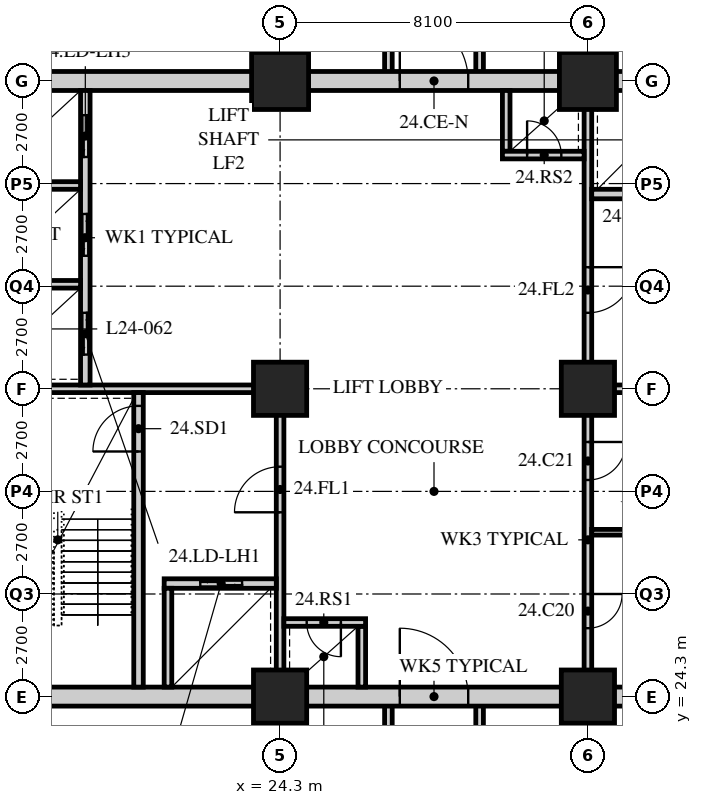
"""IFC4 building model, lengths in metres.
Left out: names, types, materials, properties, quantities, classifications, styles, units other than length and angle.
Written with IfcOpenShell. Run it as: python <this file> out.ifc"""

import sys

from ifc_helpers import new_model, si_unit, direction, frame, frame_2d, origin, origin_2d, place, context, subcontext, project, spatial, rectangle, hollow_rectangle, extrude, element, fill, save


model = new_model("IFC4")
c1 = context("Model", 3, precision=1e-05, world=origin(), true_north=direction((0.0, 1.0)))
c2 = subcontext(c1, "Body", "Model", "MODEL_VIEW")
j1 = project(units=[si_unit("LENGTHUNIT", "METRE"), si_unit("PLANEANGLEUNIT", "RADIAN")], contexts=[c1])
p1 = place(None, origin())
s1 = spatial("IfcSite", under=j1, at=p1, CompositionType="ELEMENT")
p2 = place(p1, origin())
s2 = spatial("IfcBuilding", under=s1, at=p2, CompositionType="ELEMENT")
p3 = place(p2, frame((0.0, 0.0, 98.0)))
s3 = spatial("IfcBuildingStorey", under=s2, at=p3, CompositionType="ELEMENT", Elevation=98.0)
for number, where, z_axis, x_axis in (
    (1, (24.3, 24.3, 0.0), (0.0, 0.0, 1.0), (1.0, 0.0, 0.0)),
    (2, (24.3, 32.4, 0.0), (0.0, 0.0, 1.0), (1.0, 0.0, 0.0)),
):
    element("IfcColumn", number, at=place(p3, frame(where, z_axis=z_axis, x_axis=x_axis)), inside=s3, PredefinedType="COLUMN", context=c2, shape_type="SweptSolid", body=[
        extrude(hollow_rectangle(XDim=1.4, YDim=1.4, WallThickness=0.12, at=origin_2d()), origin(), (0.0, 0.0, 1.0), 5.4),
    ])
p4 = place(p3, frame((24.3, 40.5, 0.0), z_axis=(0.0, 0.0, 1.0), x_axis=(1.0, 0.0, 0.0)))
e3 = element("IfcColumn", 3, at=p4, inside=s3, PredefinedType="COLUMN", context=c2, shape_type="SweptSolid", body=[
    extrude(hollow_rectangle(XDim=1.5, YDim=1.5, WallThickness=0.13, at=origin_2d()), origin(), (0.0, 0.0, 1.0), 5.4),
])
for number, where, z_axis, x_axis in (
    (4, (32.4, 24.3, 0.0), (0.0, 0.0, 1.0), (1.0, 0.0, 0.0)),
    (5, (32.4, 32.4, 0.0), (0.0, 0.0, 1.0), (1.0, 0.0, 0.0)),
):
    element("IfcColumn", number, at=place(p3, frame(where, z_axis=z_axis, x_axis=x_axis)), inside=s3, PredefinedType="COLUMN", context=c2, shape_type="SweptSolid", body=[
        extrude(hollow_rectangle(XDim=1.4, YDim=1.4, WallThickness=0.12, at=origin_2d()), origin(), (0.0, 0.0, 1.0), 5.4),
    ])
p5 = place(p3, frame((32.4, 40.5, 0.0), z_axis=(0.0, 0.0, 1.0), x_axis=(1.0, 0.0, 0.0)))
e6 = element("IfcColumn", 6, at=p5, inside=s3, PredefinedType="COLUMN", context=c2, shape_type="SweptSolid", body=[
    extrude(hollow_rectangle(XDim=1.5, YDim=1.5, WallThickness=0.13, at=origin_2d()), origin(), (0.0, 0.0, 1.0), 5.4),
])
for number, where, z_axis, x_axis in (
    (7, (27.15, 15.3, 0.0), (0.0, 0.0, 1.0), (0.0, 1.0, 0.0)),
    (8, (29.55, 15.3, 0.0), (0.0, 0.0, 1.0), (0.0, 1.0, 0.0)),
):
    element("IfcWall", number, at=place(p3, frame(where, z_axis=z_axis, x_axis=x_axis)), inside=s3, PredefinedType="SOLIDWALL", context=c2, shape_type="SweptSolid", body=[
        extrude(rectangle(XDim=9.0, YDim=0.2, at=frame_2d((4.5, 0.0))), origin(), (0.0, 0.0, 1.0), 5.19),
    ])
for number, where, z_axis, x_axis in (
    (9, (27.15, 40.5, 0.0), (0.0, 0.0, 1.0), (0.0, 1.0, 0.0)),
    (10, (29.55, 40.5, 0.0), (0.0, 0.0, 1.0), (0.0, 1.0, 0.0)),
):
    element("IfcWall", number, at=place(p3, frame(where, z_axis=z_axis, x_axis=x_axis)), inside=s3, PredefinedType="SOLIDWALL", context=c2, shape_type="SweptSolid", body=[
        extrude(rectangle(XDim=3.6, YDim=0.2, at=frame_2d((1.8, 0.0))), origin(), (0.0, 0.0, 1.0), 5.19),
    ])
p6 = place(p3, frame((15.95, 24.3, 0.0), z_axis=(0.0, 0.0, 1.0), x_axis=(1.0, 0.0, 0.0)))
e11 = element("IfcWall", 11, at=p6, inside=s3, PredefinedType="SOLIDWALL", context=c2, shape_type="SweptSolid", body=[
    extrude(rectangle(XDim=24.8, YDim=0.5, at=frame_2d((12.4, 0.0))), origin(), (0.0, 0.0, 1.0), 4.49),
])
p7 = place(p6, frame((11.5, 0.0, 0.0)))
e12 = element("IfcOpeningElement", 12, at=p7, cuts=e11, PredefinedType="OPENING", context=c2, shape_type="SweptSolid", body=[
    extrude(rectangle(XDim=1.8, YDim=2.4, at=frame_2d((0.9, 1.2))), frame((0.0, 0.26, 0.0), z_axis=(0.0, -1.0, 0.0), x_axis=(1.0, 0.0, 0.0)), (0.0, 0.0, 1.0), 0.52),
])
p8 = place(p3, frame((15.95, 40.5, 0.0), z_axis=(0.0, 0.0, 1.0), x_axis=(1.0, 0.0, 0.0)))
e13 = element("IfcWall", 13, at=p8, inside=s3, PredefinedType="SOLIDWALL", context=c2, shape_type="SweptSolid", body=[
    extrude(rectangle(XDim=24.8, YDim=0.5, at=frame_2d((12.4, 0.0))), origin(), (0.0, 0.0, 1.0), 4.49),
])
p9 = place(p8, frame((11.5, 0.0, 0.0)))
e14 = element("IfcOpeningElement", 14, at=p9, cuts=e13, PredefinedType="OPENING", context=c2, shape_type="SweptSolid", body=[
    extrude(rectangle(XDim=1.8, YDim=2.4, at=frame_2d((0.9, 1.2))), frame((0.0, 0.26, 0.0), z_axis=(0.0, -1.0, 0.0), x_axis=(1.0, 0.0, 0.0)), (0.0, 0.0, 1.0), 0.52),
])
p10 = place(p3, frame((16.45, 32.4, 0.0), z_axis=(0.0, 0.0, 1.0), x_axis=(1.0, 0.0, 0.0)))
e15 = element("IfcWall", 15, at=p10, inside=s3, PredefinedType="SOLIDWALL", context=c2, shape_type="SweptSolid", body=[
    extrude(rectangle(XDim=7.95, YDim=0.2, at=frame_2d((3.975, 0.0))), origin(), (0.0, 0.0, 1.0), 4.578),
])
p11 = place(p3, frame((24.3, 24.55, 0.0), z_axis=(0.0, 0.0, 1.0), x_axis=(0.0, 1.0, 0.0)))
e16 = element("IfcWall", 16, at=p11, inside=s3, PredefinedType="SOLIDWALL", context=c2, shape_type="SweptSolid", body=[
    extrude(rectangle(XDim=7.75, YDim=0.2, at=frame_2d((3.875, 0.0))), origin(), (0.0, 0.0, 1.0), 4.578),
])
p12 = place(p11, frame((4.6, 0.0, 0.0)))
e17 = element("IfcOpeningElement", 17, at=p12, cuts=e16, PredefinedType="OPENING", context=c2, shape_type="SweptSolid", body=[
    extrude(rectangle(XDim=1.2, YDim=2.1, at=frame_2d((0.6, 1.05))), frame((0.0, 0.11, 0.0), z_axis=(0.0, -1.0, 0.0), x_axis=(1.0, 0.0, 0.0)), (0.0, 0.0, 1.0), 0.22),
])
p13 = place(p3, frame((20.575, 24.55, 0.0), z_axis=(0.0, 0.0, 1.0), x_axis=(0.0, 1.0, 0.0)))
e18 = element("IfcWall", 18, at=p13, inside=s3, PredefinedType="SOLIDWALL", context=c2, shape_type="SweptSolid", body=[
    extrude(rectangle(XDim=7.75, YDim=0.25, at=frame_2d((3.875, 0.0))), origin(), (0.0, 0.0, 1.0), 5.19),
])
p14 = place(p13, frame((6.2, 0.0, 0.0)))
e19 = element("IfcOpeningElement", 19, at=p14, cuts=e18, PredefinedType="OPENING", context=c2, shape_type="SweptSolid", body=[
    extrude(rectangle(XDim=1.2, YDim=2.1, at=frame_2d((0.6, 1.05))), frame((0.0, 0.135, 0.0), z_axis=(0.0, -1.0, 0.0), x_axis=(1.0, 0.0, 0.0)), (0.0, 0.0, 1.0), 0.27),
])
p15 = place(p3, frame((21.25, 27.275, 0.0), z_axis=(0.0, 0.0, 1.0), x_axis=(1.0, 0.0, 0.0)))
e20 = element("IfcWall", 20, at=p15, inside=s3, PredefinedType="SOLIDWALL", context=c2, shape_type="SweptSolid", body=[
    extrude(rectangle(XDim=2.95, YDim=0.25, at=frame_2d((1.475, 0.0))), origin(), (0.0, 0.0, 1.0), 5.19),
])
p16 = place(p15, frame((0.95, 0.0, 0.0)))
e21 = element("IfcOpeningElement", 21, at=p16, cuts=e20, PredefinedType="OPENING", context=c2, shape_type="SweptSolid", body=[
    extrude(rectangle(XDim=1.1, YDim=2.4, at=frame_2d((0.55, 1.2))), frame((0.0, 0.135, 0.0), z_axis=(0.0, -1.0, 0.0), x_axis=(1.0, 0.0, 0.0)), (0.0, 0.0, 1.0), 0.27),
])
p17 = place(p3, frame((21.35, 24.55, 0.0), z_axis=(0.0, 0.0, 1.0), x_axis=(0.0, 1.0, 0.0)))
e22 = element("IfcWall", 22, at=p17, inside=s3, PredefinedType="SOLIDWALL", context=c2, shape_type="SweptSolid", body=[
    extrude(rectangle(XDim=2.6, YDim=0.2, at=frame_2d((1.3, 0.0))), origin(), (0.0, 0.0, 1.0), 5.19),
])
p18 = place(p3, frame((19.175, 32.5, 0.0), z_axis=(0.0, 0.0, 1.0), x_axis=(0.0, 1.0, 0.0)))
e23 = element("IfcWall", 23, at=p18, inside=s3, PredefinedType="SOLIDWALL", context=c2, shape_type="SweptSolid", body=[
    extrude(rectangle(XDim=7.75, YDim=0.25, at=frame_2d((3.875, 0.0))), origin(), (0.0, 0.0, 1.0), 5.19),
])
p19 = place(p18, frame((0.8, 0.0, 0.0)))
e24 = element("IfcOpeningElement", 24, at=p19, cuts=e23, PredefinedType="OPENING", context=c2, shape_type="SweptSolid", body=[
    extrude(rectangle(XDim=1.1, YDim=2.4, at=frame_2d((0.55, 1.2))), frame((0.0, 0.135, 0.0), z_axis=(0.0, -1.0, 0.0), x_axis=(1.0, 0.0, 0.0)), (0.0, 0.0, 1.0), 0.27),
])
p20 = place(p18, frame((3.4, 0.0, 0.0)))
e25 = element("IfcOpeningElement", 25, at=p20, cuts=e23, PredefinedType="OPENING", context=c2, shape_type="SweptSolid", body=[
    extrude(rectangle(XDim=1.1, YDim=2.4, at=frame_2d((0.55, 1.2))), frame((0.0, 0.135, 0.0), z_axis=(0.0, -1.0, 0.0), x_axis=(1.0, 0.0, 0.0)), (0.0, 0.0, 1.0), 0.27),
])
p21 = place(p18, frame((6.0, 0.0, 0.0)))
e26 = element("IfcOpeningElement", 26, at=p21, cuts=e23, PredefinedType="OPENING", context=c2, shape_type="SweptSolid", body=[
    extrude(rectangle(XDim=1.1, YDim=2.4, at=frame_2d((0.55, 1.2))), frame((0.0, 0.135, 0.0), z_axis=(0.0, -1.0, 0.0), x_axis=(1.0, 0.0, 0.0)), (0.0, 0.0, 1.0), 0.27),
])
for number, where, z_axis, x_axis in (
    (27, (16.45, 35.15, 0.0), (0.0, 0.0, 1.0), (1.0, 0.0, 0.0)),
    (28, (16.45, 37.75, 0.0), (0.0, 0.0, 1.0), (1.0, 0.0, 0.0)),
):
    element("IfcWall", number, at=place(p3, frame(where, z_axis=z_axis, x_axis=x_axis)), inside=s3, PredefinedType="SOLIDWALL", context=c2, shape_type="SweptSolid", body=[
        extrude(rectangle(XDim=2.6, YDim=0.2, at=frame_2d((1.3, 0.0))), origin(), (0.0, 0.0, 1.0), 5.19),
    ])
p22 = place(p3, frame((26.45, 24.55, 0.0), z_axis=(0.0, 0.0, 1.0), x_axis=(0.0, 1.0, 0.0)))
e29 = element("IfcWall", 29, at=p22, inside=s3, PredefinedType="SOLIDWALL", context=c2, shape_type="SweptSolid", body=[
    extrude(rectangle(XDim=1.6, YDim=0.2, at=frame_2d((0.8, 0.0))), origin(), (0.0, 0.0, 1.0), 5.19),
])
p23 = place(p3, frame((24.4, 26.25, 0.0), z_axis=(0.0, 0.0, 1.0), x_axis=(1.0, 0.0, 0.0)))
e30 = element("IfcWall", 30, at=p23, inside=s3, PredefinedType="SOLIDWALL", context=c2, shape_type="SweptSolid", body=[
    extrude(rectangle(XDim=2.15, YDim=0.2, at=frame_2d((1.075, 0.0))), origin(), (0.0, 0.0, 1.0), 5.19),
])
p24 = place(p23, frame((0.6, 0.0, 0.0)))
e31 = element("IfcOpeningElement", 31, at=p24, cuts=e30, PredefinedType="OPENING", context=c2, shape_type="SweptSolid", body=[
    extrude(rectangle(XDim=0.9, YDim=2.1, at=frame_2d((0.45, 1.05))), frame((0.0, 0.11, 0.0), z_axis=(0.0, -1.0, 0.0), x_axis=(1.0, 0.0, 0.0)), (0.0, 0.0, 1.0), 0.22),
])
p25 = place(p3, frame((32.3, 32.4, 0.0), z_axis=(0.0, 0.0, 1.0), x_axis=(1.0, 0.0, 0.0)))
e32 = element("IfcWall", 32, at=p25, inside=s3, PredefinedType="SOLIDWALL", context=c2, shape_type="SweptSolid", body=[
    extrude(rectangle(XDim=7.95, YDim=0.2, at=frame_2d((3.975, 0.0))), origin(), (0.0, 0.0, 1.0), 4.578),
])
p26 = place(p3, frame((32.4, 32.5, 0.0), z_axis=(0.0, 0.0, 1.0), x_axis=(0.0, 1.0, 0.0)))
e33 = element("IfcWall", 33, at=p26, inside=s3, PredefinedType="SOLIDWALL", context=c2, shape_type="SweptSolid", body=[
    extrude(rectangle(XDim=7.75, YDim=0.2, at=frame_2d((3.875, 0.0))), origin(), (0.0, 0.0, 1.0), 4.578),
])
p27 = place(p26, frame((1.9, 0.0, 0.0)))
e34 = element("IfcOpeningElement", 34, at=p27, cuts=e33, PredefinedType="OPENING", context=c2, shape_type="SweptSolid", body=[
    extrude(rectangle(XDim=1.2, YDim=2.1, at=frame_2d((0.6, 1.05))), frame((0.0, 0.11, 0.0), z_axis=(0.0, -1.0, 0.0), x_axis=(1.0, 0.0, 0.0)), (0.0, 0.0, 1.0), 0.22),
])
p28 = place(p3, frame((32.5, 37.525, 0.0), z_axis=(0.0, 0.0, 1.0), x_axis=(1.0, 0.0, 0.0)))
e35 = element("IfcWall", 35, at=p28, inside=s3, PredefinedType="SOLIDWALL", context=c2, shape_type="SweptSolid", body=[
    extrude(rectangle(XDim=2.95, YDim=0.25, at=frame_2d((1.475, 0.0))), origin(), (0.0, 0.0, 1.0), 5.19),
])
p29 = place(p28, frame((0.9, 0.0, 0.0)))
e36 = element("IfcOpeningElement", 36, at=p29, cuts=e35, PredefinedType="OPENING", context=c2, shape_type="SweptSolid", body=[
    extrude(rectangle(XDim=1.1, YDim=2.4, at=frame_2d((0.55, 1.2))), frame((0.0, 0.135, 0.0), z_axis=(0.0, -1.0, 0.0), x_axis=(1.0, 0.0, 0.0)), (0.0, 0.0, 1.0), 0.27),
])
p30 = place(p3, frame((30.25, 38.65, 0.0), z_axis=(0.0, 0.0, 1.0), x_axis=(0.0, 1.0, 0.0)))
e37 = element("IfcWall", 37, at=p30, inside=s3, PredefinedType="SOLIDWALL", context=c2, shape_type="SweptSolid", body=[
    extrude(rectangle(XDim=1.6, YDim=0.2, at=frame_2d((0.8, 0.0))), origin(), (0.0, 0.0, 1.0), 5.19),
])
p31 = place(p3, frame((30.15, 38.55, 0.0), z_axis=(0.0, 0.0, 1.0), x_axis=(1.0, 0.0, 0.0)))
e38 = element("IfcWall", 38, at=p31, inside=s3, PredefinedType="SOLIDWALL", context=c2, shape_type="SweptSolid", body=[
    extrude(rectangle(XDim=2.15, YDim=0.2, at=frame_2d((1.075, 0.0))), origin(), (0.0, 0.0, 1.0), 5.19),
])
p32 = place(p31, frame((0.65, 0.0, 0.0)))
e39 = element("IfcOpeningElement", 39, at=p32, cuts=e38, PredefinedType="OPENING", context=c2, shape_type="SweptSolid", body=[
    extrude(rectangle(XDim=0.9, YDim=2.1, at=frame_2d((0.45, 1.05))), frame((0.0, 0.11, 0.0), z_axis=(0.0, -1.0, 0.0), x_axis=(1.0, 0.0, 0.0)), (0.0, 0.0, 1.0), 0.22),
])
p33 = place(p3, frame((32.4, 24.55, 0.0), z_axis=(0.0, 0.0, 1.0), x_axis=(0.0, 1.0, 0.0)))
e40 = element("IfcWall", 40, at=p33, inside=s3, PredefinedType="PARTITIONING", context=c2, shape_type="SweptSolid", body=[
    extrude(rectangle(XDim=7.75, YDim=0.2, at=frame_2d((3.875, 0.0))), origin(), (0.0, 0.0, 1.0), 4.578),
])
p34 = place(p33, frame((1.55, 0.0, 0.0)))
e41 = element("IfcOpeningElement", 41, at=p34, cuts=e40, PredefinedType="OPENING", context=c2, shape_type="SweptSolid", body=[
    extrude(rectangle(XDim=0.9, YDim=2.1, at=frame_2d((0.45, 1.05))), frame((0.0, 0.11, 0.0), z_axis=(0.0, -1.0, 0.0), x_axis=(1.0, 0.0, 0.0)), (0.0, 0.0, 1.0), 0.22),
])
p35 = place(p33, frame((5.45, 0.0, 0.0)))
e42 = element("IfcOpeningElement", 42, at=p35, cuts=e40, PredefinedType="OPENING", context=c2, shape_type="SweptSolid", body=[
    extrude(rectangle(XDim=1.0, YDim=2.1, at=frame_2d((0.5, 1.05))), frame((0.0, 0.11, 0.0), z_axis=(0.0, -1.0, 0.0), x_axis=(1.0, 0.0, 0.0)), (0.0, 0.0, 1.0), 0.22),
])
p36 = place(p3, frame((32.5, 28.625, 0.0), z_axis=(0.0, 0.0, 1.0), x_axis=(1.0, 0.0, 0.0)))
e43 = element("IfcWall", 43, at=p36, inside=s3, PredefinedType="PARTITIONING", context=c2, shape_type="SweptSolid", body=[
    extrude(rectangle(XDim=4.9, YDim=0.15, at=frame_2d((2.45, 0.0))), origin(), (0.0, 0.0, 1.0), 5.19),
])
p37 = place(p34, origin())
e44 = element("IfcDoor", 44, at=p37, inside=s3, OperationType="SINGLE_SWING_LEFT", PredefinedType="DOOR", context=c2, shape_type="SweptSolid", body=[
    extrude(rectangle(XDim=0.9, YDim=2.1, at=frame_2d((0.45, 1.05))), frame((0.0, 0.025, 0.0), z_axis=(0.0, -1.0, 0.0), x_axis=(1.0, 0.0, 0.0)), (0.0, 0.0, 1.0), 0.05),
])
fill(e41, e44)
p38 = place(p35, origin())
e45 = element("IfcDoor", 45, at=p38, inside=s3, OperationType="SINGLE_SWING_LEFT", PredefinedType="DOOR", context=c2, shape_type="SweptSolid", body=[
    extrude(rectangle(XDim=1.0, YDim=2.1, at=frame_2d((0.5, 1.05))), frame((0.0, 0.025, 0.0), z_axis=(0.0, -1.0, 0.0), x_axis=(1.0, 0.0, 0.0)), (0.0, 0.0, 1.0), 0.05),
])
fill(e42, e45)
p39 = place(p14, origin())
e46 = element("IfcDoor", 46, at=p39, inside=s3, OperationType="SINGLE_SWING_LEFT", PredefinedType="DOOR", context=c2, shape_type="SweptSolid", body=[
    extrude(rectangle(XDim=1.2, YDim=2.1, at=frame_2d((0.6, 1.05))), frame((0.0, 0.025, 0.0), z_axis=(0.0, -1.0, 0.0), x_axis=(1.0, 0.0, 0.0)), (0.0, 0.0, 1.0), 0.05),
])
fill(e19, e46)
p40 = place(p12, origin())
e47 = element("IfcDoor", 47, at=p40, inside=s3, OperationType="SINGLE_SWING_LEFT", PredefinedType="DOOR", context=c2, shape_type="SweptSolid", body=[
    extrude(rectangle(XDim=1.2, YDim=2.1, at=frame_2d((0.6, 1.05))), frame((0.0, 0.025, 0.0), z_axis=(0.0, -1.0, 0.0), x_axis=(1.0, 0.0, 0.0)), (0.0, 0.0, 1.0), 0.05),
])
fill(e17, e47)
p41 = place(p24, origin())
e48 = element("IfcDoor", 48, at=p41, inside=s3, OperationType="SINGLE_SWING_LEFT", PredefinedType="DOOR", context=c2, shape_type="SweptSolid", body=[
    extrude(rectangle(XDim=0.9, YDim=2.1, at=frame_2d((0.45, 1.05))), frame((0.0, 0.025, 0.0), z_axis=(0.0, -1.0, 0.0), x_axis=(1.0, 0.0, 0.0)), (0.0, 0.0, 1.0), 0.05),
])
fill(e31, e48)
p42 = place(p27, origin())
e49 = element("IfcDoor", 49, at=p42, inside=s3, OperationType="SINGLE_SWING_LEFT", PredefinedType="DOOR", context=c2, shape_type="SweptSolid", body=[
    extrude(rectangle(XDim=1.2, YDim=2.1, at=frame_2d((0.6, 1.05))), frame((0.0, 0.025, 0.0), z_axis=(0.0, -1.0, 0.0), x_axis=(1.0, 0.0, 0.0)), (0.0, 0.0, 1.0), 0.05),
])
fill(e34, e49)
p43 = place(p32, origin())
e50 = element("IfcDoor", 50, at=p43, inside=s3, OperationType="SINGLE_SWING_LEFT", PredefinedType="DOOR", context=c2, shape_type="SweptSolid", body=[
    extrude(rectangle(XDim=0.9, YDim=2.1, at=frame_2d((0.45, 1.05))), frame((0.0, 0.025, 0.0), z_axis=(0.0, -1.0, 0.0), x_axis=(1.0, 0.0, 0.0)), (0.0, 0.0, 1.0), 0.05),
])
fill(e39, e50)
p44 = place(p19, origin())
e51 = element("IfcDoor", 51, at=p44, inside=s3, OperationType="DOUBLE_DOOR_SLIDING", PredefinedType="DOOR", context=c2, shape_type="SweptSolid", body=[
    extrude(rectangle(XDim=1.1, YDim=2.4, at=frame_2d((0.55, 1.2))), frame((0.0, 0.025, 0.0), z_axis=(0.0, -1.0, 0.0), x_axis=(1.0, 0.0, 0.0)), (0.0, 0.0, 1.0), 0.05),
])
fill(e24, e51)
p45 = place(p20, origin())
e52 = element("IfcDoor", 52, at=p45, inside=s3, OperationType="DOUBLE_DOOR_SLIDING", PredefinedType="DOOR", context=c2, shape_type="SweptSolid", body=[
    extrude(rectangle(XDim=1.1, YDim=2.4, at=frame_2d((0.55, 1.2))), frame((0.0, 0.025, 0.0), z_axis=(0.0, -1.0, 0.0), x_axis=(1.0, 0.0, 0.0)), (0.0, 0.0, 1.0), 0.05),
])
fill(e25, e52)
p46 = place(p21, origin())
e53 = element("IfcDoor", 53, at=p46, inside=s3, OperationType="DOUBLE_DOOR_SLIDING", PredefinedType="DOOR", context=c2, shape_type="SweptSolid", body=[
    extrude(rectangle(XDim=1.1, YDim=2.4, at=frame_2d((0.55, 1.2))), frame((0.0, 0.025, 0.0), z_axis=(0.0, -1.0, 0.0), x_axis=(1.0, 0.0, 0.0)), (0.0, 0.0, 1.0), 0.05),
])
fill(e26, e53)
p47 = place(p16, origin())
e54 = element("IfcDoor", 54, at=p47, inside=s3, OperationType="DOUBLE_DOOR_SLIDING", PredefinedType="DOOR", context=c2, shape_type="SweptSolid", body=[
    extrude(rectangle(XDim=1.1, YDim=2.4, at=frame_2d((0.55, 1.2))), frame((0.0, 0.025, 0.0), z_axis=(0.0, -1.0, 0.0), x_axis=(1.0, 0.0, 0.0)), (0.0, 0.0, 1.0), 0.05),
])
fill(e21, e54)
p48 = place(p7, origin())
e55 = element("IfcDoor", 55, at=p48, inside=s3, OperationType="DOUBLE_DOOR_SINGLE_SWING", PredefinedType="DOOR", context=c2, shape_type="SweptSolid", body=[
    extrude(rectangle(XDim=1.8, YDim=2.4, at=frame_2d((0.9, 1.2))), frame((0.0, 0.025, 0.0), z_axis=(0.0, -1.0, 0.0), x_axis=(1.0, 0.0, 0.0)), (0.0, 0.0, 1.0), 0.05),
])
fill(e12, e55)
p49 = place(p9, origin())
e56 = element("IfcDoor", 56, at=p49, inside=s3, OperationType="DOUBLE_DOOR_SINGLE_SWING", PredefinedType="DOOR", context=c2, shape_type="SweptSolid", body=[
    extrude(rectangle(XDim=1.8, YDim=2.4, at=frame_2d((0.9, 1.2))), frame((0.0, 0.025, 0.0), z_axis=(0.0, -1.0, 0.0), x_axis=(1.0, 0.0, 0.0)), (0.0, 0.0, 1.0), 0.05),
])
fill(e14, e56)
save(model, sys.argv[1])
